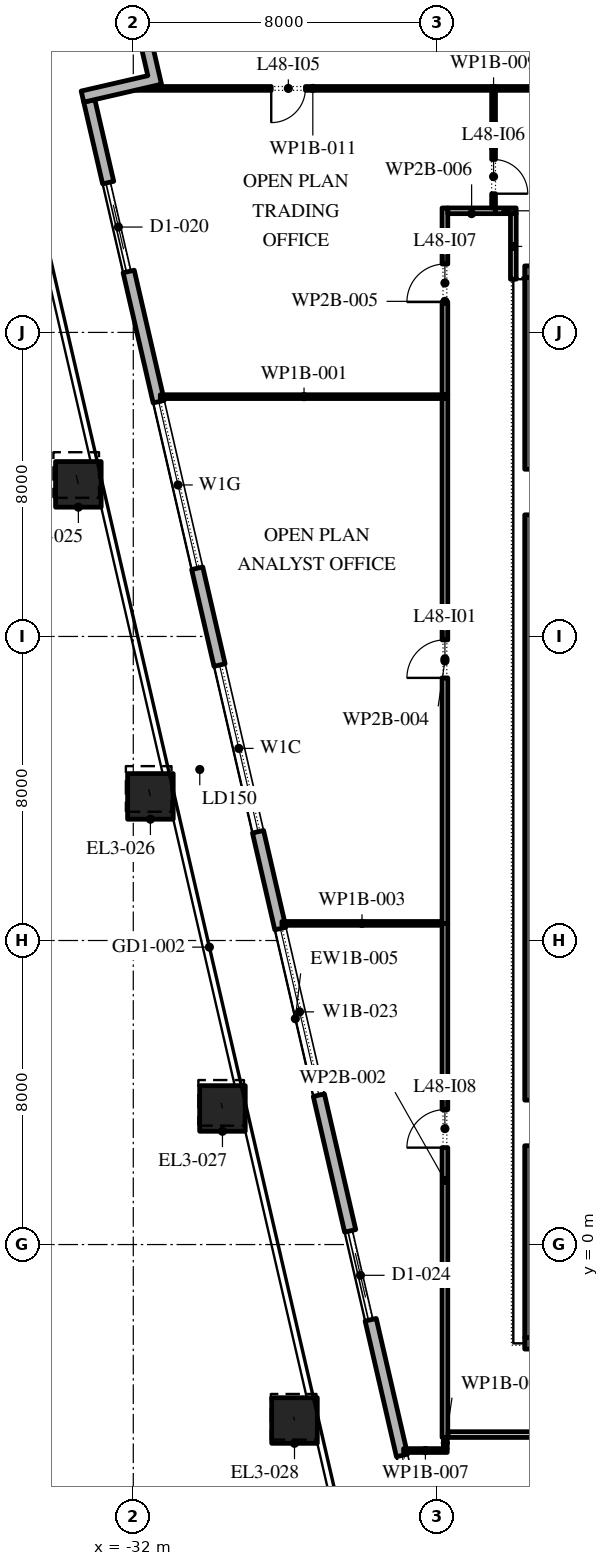
"""IFC4 building model, lengths in metres.
Left out: names, types, materials, properties, quantities, classifications, styles, units other than length and angle.
Written with IfcOpenShell. Run it as: python <this file> out.ifc"""

import sys

from ifc_helpers import new_model, si_unit, direction, frame, frame_2d, origin, origin_2d, place, context, subcontext, project, spatial, polyline, rectangle, outline, extrude, element, fill, save


model = new_model("IFC4")
c1 = context("Model", 3, precision=1e-05, world=origin(), true_north=direction((0.0, 1.0)))
c2 = subcontext(c1, "Body", "Model", "MODEL_VIEW")
j1 = project(units=[si_unit("LENGTHUNIT", "METRE"), si_unit("PLANEANGLEUNIT", "RADIAN")], contexts=[c1])
p1 = place(None, origin())
s1 = spatial("IfcSite", under=j1, at=p1, CompositionType="ELEMENT")
p2 = place(p1, origin())
s2 = spatial("IfcBuilding", under=s1, at=p2, CompositionType="ELEMENT")
p3 = place(p2, frame((0.0, 0.0, 217.8)))
s3 = spatial("IfcBuildingStorey", under=s2, at=p3, CompositionType="ELEMENT", Elevation=217.8)
p4 = place(p3, frame((-33.445, 20.002, 0.0), z_axis=(-0.013461799865, 0.058373149415, 0.998204064995), x_axis=(-0.974423835271, -0.224718021653, 0.0)))
e1 = element("IfcColumn", 1, at=p4, inside=s3, PredefinedType="COLUMN", context=c2, shape_type="SweptSolid", body=[
    extrude(rectangle(XDim=1.2, YDim=1.2, at=origin_2d()), origin(), (0.0, 0.0, 1.0), 4.208),
])
p5 = place(p3, frame((-31.549, 11.792, 0.0), z_axis=(-0.010741593044, 0.046682382742, 0.99885202774), x_axis=(-0.974534000035, -0.224239788565, 0.0)))
e2 = element("IfcColumn", 2, at=p5, inside=s3, PredefinedType="COLUMN", context=c2, shape_type="SweptSolid", body=[
    extrude(rectangle(XDim=1.2, YDim=1.2, at=origin_2d()), origin(), (0.0, 0.0, 1.0), 4.205),
])
p6 = place(p3, frame((-29.654, 3.581, 0.0), z_axis=(-0.008074763646, 0.035029370347, 0.999353661826), x_axis=(-0.974445638882, -0.224623455729, 0.0)))
e3 = element("IfcColumn", 3, at=p6, inside=s3, PredefinedType="COLUMN", context=c2, shape_type="SweptSolid", body=[
    extrude(rectangle(XDim=1.2, YDim=1.2, at=origin_2d()), origin(), (0.0, 0.0, 1.0), 4.203),
])
p7 = place(p3, frame((-27.758, -4.63, 0.0), z_axis=(-0.005404479485, 0.023361298418, 0.999712479335), x_axis=(-0.974268511785, -0.225390476607, 0.0)))
e4 = element("IfcColumn", 4, at=p7, inside=s3, PredefinedType="COLUMN", context=c2, shape_type="SweptSolid", body=[
    extrude(rectangle(XDim=1.2, YDim=1.2, at=origin_2d()), origin(), (0.0, 0.0, 1.0), 4.201),
])
p8 = place(p3, frame((-33.157, 30.092, 0.0), z_axis=(0.0, 0.0, 1.0), x_axis=(0.224950279389, -0.974370243697, 0.0)))
e5 = element("IfcWall", 5, at=p8, inside=s3, PredefinedType="STANDARD", context=c2, shape_type="SweptSolid", body=[
    extrude(rectangle(XDim=49.5, YDim=0.3, at=frame_2d((24.75, 0.0))), origin(), (0.0, 0.0, 1.0), 3.95),
])
p9 = place(p8, frame((2.207, 0.0, 0.0)))
e6 = element("IfcOpeningElement", 6, at=p9, cuts=e5, PredefinedType="OPENING", context=c2, shape_type="SweptSolid", body=[
    extrude(rectangle(XDim=2.4, YDim=3.5, at=frame_2d((1.2, 1.75))), frame((0.0, 0.16, 0.0), z_axis=(0.0, -1.0, 0.0), x_axis=(1.0, 0.0, 0.0)), (0.0, 0.0, 1.0), 0.32),
])
p10 = place(p8, frame((8.121, 0.0, 0.45)))
e7 = element("IfcOpeningElement", 7, at=p10, cuts=e5, PredefinedType="OPENING", context=c2, shape_type="SweptSolid", body=[
    extrude(rectangle(XDim=4.5, YDim=2.775, at=frame_2d((2.25, 1.387))), frame((0.0, 0.16, 0.0), z_axis=(0.0, -1.0, 0.0), x_axis=(1.0, 0.0, 0.0)), (0.0, 0.0, 1.0), 0.32),
])
p11 = place(p8, frame((15.236, 0.0, 0.45)))
e8 = element("IfcOpeningElement", 8, at=p11, cuts=e5, PredefinedType="OPENING", context=c2, shape_type="SweptSolid", body=[
    extrude(rectangle(XDim=4.5, YDim=2.9, at=frame_2d((2.25, 1.45))), frame((0.0, 0.16, 0.0), z_axis=(0.0, -1.0, 0.0), x_axis=(1.0, 0.0, 0.0)), (0.0, 0.0, 1.0), 0.32),
])
p12 = place(p8, frame((22.35, 0.0, 0.45)))
e9 = element("IfcOpeningElement", 9, at=p12, cuts=e5, PredefinedType="OPENING", context=c2, shape_type="SweptSolid", body=[
    extrude(rectangle(XDim=4.5, YDim=2.95, at=frame_2d((2.25, 1.475))), frame((0.0, 0.16, 0.0), z_axis=(0.0, -1.0, 0.0), x_axis=(1.0, 0.0, 0.0)), (0.0, 0.0, 1.0), 0.32),
])
p13 = place(p8, frame((30.514, 0.0, 0.0)))
e10 = element("IfcOpeningElement", 10, at=p13, cuts=e5, PredefinedType="OPENING", context=c2, shape_type="SweptSolid", body=[
    extrude(rectangle(XDim=2.4, YDim=3.5, at=frame_2d((1.2, 1.75))), frame((0.0, 0.16, 0.0), z_axis=(0.0, -1.0, 0.0), x_axis=(1.0, 0.0, 0.0)), (0.0, 0.0, 1.0), 0.32),
])
p14 = place(p8, frame((36.579, 0.0, 0.45)))
e11 = element("IfcOpeningElement", 11, at=p14, cuts=e5, PredefinedType="OPENING", context=c2, shape_type="SweptSolid", body=[
    extrude(rectangle(XDim=4.5, YDim=3.05, at=frame_2d((2.25, 1.525))), frame((0.0, 0.16, 0.0), z_axis=(0.0, -1.0, 0.0), x_axis=(1.0, 0.0, 0.0)), (0.0, 0.0, 1.0), 0.32),
])
p15 = place(p8, frame((43.693, 0.0, 0.45)))
e12 = element("IfcOpeningElement", 12, at=p15, cuts=e5, PredefinedType="OPENING", context=c2, shape_type="SweptSolid", body=[
    extrude(rectangle(XDim=4.5, YDim=3.05, at=frame_2d((2.25, 1.525))), frame((0.0, 0.16, 0.0), z_axis=(0.0, -1.0, 0.0), x_axis=(1.0, 0.0, 0.0)), (0.0, 0.0, 1.0), 0.32),
])
p16 = place(p3, origin())
e13 = element("IfcWall", 13, at=p16, inside=s3, PredefinedType="STANDARD", context=c2, shape_type="SweptSolid", body=[
    extrude(outline(polyline([(-31.617, 30.756), (-32.022, 32.51), (-30.268, 32.914), (-30.605, 34.376), (-30.313, 34.443), (-29.908, 32.69), (-31.662, 32.285), (-31.257, 30.531), (-33.303, 30.058), (-33.371, 30.351), (-31.617, 30.756)])), origin(), (0.0, 0.0, 1.0), 3.95),
])
p17 = place(p3, frame((-21.35, -2.45, 0.0), z_axis=(0.0, 0.0, 1.0), x_axis=(0.0, 1.0, 0.0)))
e14 = element("IfcWall", 14, at=p17, inside=s3, PredefinedType="SHEAR", context=c2, shape_type="SweptSolid", body=[
    extrude(rectangle(XDim=27.9, YDim=0.7, at=frame_2d((13.95, 0.0))), origin(), (0.0, 0.0, 1.0), 3.95),
])
p18 = place(p17, frame((5.05, 0.0, 0.0)))
e15 = element("IfcOpeningElement", 15, at=p18, cuts=e14, PredefinedType="OPENING", context=c2, shape_type="SweptSolid", body=[
    extrude(rectangle(XDim=1.2, YDim=2.1, at=frame_2d((0.6, 1.05))), frame((0.0, 0.36, 0.0), z_axis=(0.0, -1.0, 0.0), x_axis=(1.0, 0.0, 0.0)), (0.0, 0.0, 1.0), 0.72),
])
p19 = place(p17, frame((21.65, 0.0, 0.0)))
e16 = element("IfcOpeningElement", 16, at=p19, cuts=e14, PredefinedType="OPENING", context=c2, shape_type="SweptSolid", body=[
    extrude(rectangle(XDim=1.2, YDim=2.1, at=frame_2d((0.6, 1.05))), frame((0.0, 0.36, 0.0), z_axis=(0.0, -1.0, 0.0), x_axis=(1.0, 0.0, 0.0)), (0.0, 0.0, 1.0), 0.72),
])
for number, where, z_axis, x_axis in (
    (17, (-21.7, -2.6, 0.0), (0.0, 0.0, 1.0), (1.0, 0.0, 0.0)),
    (18, (-21.7, 25.6, 0.0), (0.0, 0.0, 1.0), (1.0, 0.0, 0.0)),
):
    element("IfcWall", number, at=place(p3, frame(where, z_axis=z_axis, x_axis=x_axis)), inside=s3, PredefinedType="SHEAR", context=c2, shape_type="SweptSolid", body=[
        extrude(rectangle(XDim=11.4, YDim=0.3, at=frame_2d((5.7, 0.0))), origin(), (0.0, 0.0, 1.0), 3.95),
    ])
p20 = place(p3, frame((-31.289, 22.31, 0.0), z_axis=(0.0, 0.0, 1.0), x_axis=(1.0, 0.0, 0.0)))
e19 = element("IfcWall", 19, at=p20, inside=s3, PredefinedType="PARTITIONING", context=c2, shape_type="SweptSolid", body=[
    extrude(rectangle(XDim=7.564, YDim=0.1, at=frame_2d((3.782, 0.0))), origin(), (0.0, 0.0, 1.0), 3.95),
])
p21 = place(p3, frame((-23.8, -5.075, 0.0), z_axis=(0.0, 0.0, 1.0), x_axis=(0.0, 1.0, 0.0)))
e20 = element("IfcWall", 20, at=p21, inside=s3, PredefinedType="PARTITIONING", context=c2, shape_type="SweptSolid", body=[
    extrude(rectangle(XDim=13.525, YDim=0.15, at=frame_2d((6.762, 0.0))), origin(), (0.0, 0.0, 1.0), 3.95),
])
p22 = place(p21, frame((7.625, 0.0, 0.0)))
e21 = element("IfcOpeningElement", 21, at=p22, cuts=e20, PredefinedType="OPENING", context=c2, shape_type="SweptSolid", body=[
    extrude(rectangle(XDim=1.0, YDim=2.1, at=frame_2d((0.5, 1.05))), frame((0.0, 0.085, 0.0), z_axis=(0.0, -1.0, 0.0), x_axis=(1.0, 0.0, 0.0)), (0.0, 0.0, 1.0), 0.17),
])
p23 = place(p3, frame((-23.875, 8.45, 0.0), z_axis=(0.0, 0.0, 1.0), x_axis=(-1.0, 0.0, 0.0)))
e22 = element("IfcWall", 22, at=p23, inside=s3, PredefinedType="PARTITIONING", context=c2, shape_type="SweptSolid", body=[
    extrude(rectangle(XDim=4.214, YDim=0.1, at=frame_2d((2.107, 0.0))), origin(), (0.0, 0.0, 1.0), 3.95),
])
p24 = place(p3, frame((-23.8, 8.45, 0.0), z_axis=(0.0, 0.0, 1.0), x_axis=(0.0, 1.0, 0.0)))
e23 = element("IfcWall", 23, at=p24, inside=s3, PredefinedType="PARTITIONING", context=c2, shape_type="SweptSolid", body=[
    extrude(rectangle(XDim=13.81, YDim=0.15, at=frame_2d((6.905, 0.0))), origin(), (0.0, 0.0, 1.0), 3.95),
])
p25 = place(p24, frame((6.46, 0.0, 0.0)))
e24 = element("IfcOpeningElement", 24, at=p25, cuts=e23, PredefinedType="OPENING", context=c2, shape_type="SweptSolid", body=[
    extrude(rectangle(XDim=1.0, YDim=2.1, at=frame_2d((0.5, 1.05))), frame((0.0, 0.085, 0.0), z_axis=(0.0, -1.0, 0.0), x_axis=(1.0, 0.0, 0.0)), (0.0, 0.0, 1.0), 0.17),
])
p26 = place(p3, frame((-23.8, 22.36, 0.0), z_axis=(0.0, 0.0, 1.0), x_axis=(0.0, 1.0, 0.0)))
e25 = element("IfcWall", 25, at=p26, inside=s3, PredefinedType="PARTITIONING", context=c2, shape_type="SweptSolid", body=[
    extrude(rectangle(XDim=4.915, YDim=0.15, at=frame_2d((2.458, 0.0))), origin(), (0.0, 0.0, 1.0), 3.95),
])
p27 = place(p26, frame((2.44, 0.0, 0.0)))
e26 = element("IfcOpeningElement", 26, at=p27, cuts=e25, PredefinedType="OPENING", context=c2, shape_type="SweptSolid", body=[
    extrude(rectangle(XDim=1.0, YDim=2.1, at=frame_2d((0.5, 1.05))), frame((0.0, 0.085, 0.0), z_axis=(0.0, -1.0, 0.0), x_axis=(1.0, 0.0, 0.0)), (0.0, 0.0, 1.0), 0.17),
])
p28 = place(p3, frame((-23.725, 27.2, 0.0), z_axis=(0.0, 0.0, 1.0), x_axis=(1.0, 0.0, 0.0)))
e27 = element("IfcWall", 27, at=p28, inside=s3, PredefinedType="PARTITIONING", context=c2, shape_type="SweptSolid", body=[
    extrude(rectangle(XDim=1.255, YDim=0.15, at=frame_2d((0.627, 0.0))), origin(), (0.0, 0.0, 1.0), 3.95),
])
p29 = place(p3, frame((-23.74, -5.42, 0.0), z_axis=(0.0, 0.0, 1.0), x_axis=(-1.0, 0.0, 0.0)))
e28 = element("IfcWall", 28, at=p29, inside=s3, PredefinedType="PARTITIONING", context=c2, shape_type="SweptSolid", body=[
    extrude(rectangle(XDim=1.147, YDim=0.1, at=frame_2d((0.573, 0.0))), origin(), (0.0, 0.0, 1.0), 3.95),
])
p30 = place(p3, frame((-23.79, -5.075, 0.0), z_axis=(0.0, 0.0, 1.0), x_axis=(0.0, -1.0, 0.0)))
e29 = element("IfcWall", 29, at=p30, inside=s3, PredefinedType="PARTITIONING", context=c2, shape_type="SweptSolid", body=[
    extrude(rectangle(XDim=0.295, YDim=0.1, at=frame_2d((0.147, 0.0))), origin(), (0.0, 0.0, 1.0), 3.95),
])
p31 = place(p3, frame((-22.52, 27.275, 0.0), z_axis=(0.0, 0.0, 1.0), x_axis=(0.0, 1.0, 0.0)))
e30 = element("IfcWall", 30, at=p31, inside=s3, PredefinedType="PARTITIONING", context=c2, shape_type="SweptSolid", body=[
    extrude(rectangle(XDim=3.195, YDim=0.1, at=frame_2d((1.598, 0.0))), origin(), (0.0, 0.0, 1.0), 3.95),
])
p32 = place(p31, frame((0.375, 0.0, 0.0)))
e31 = element("IfcOpeningElement", 31, at=p32, cuts=e30, PredefinedType="OPENING", context=c2, shape_type="SweptSolid", body=[
    extrude(rectangle(XDim=0.9, YDim=2.1, at=frame_2d((0.45, 1.05))), frame((0.0, 0.06, 0.0), z_axis=(0.0, -1.0, 0.0), x_axis=(1.0, 0.0, 0.0)), (0.0, 0.0, 1.0), 0.12),
])
p33 = place(p3, frame((-22.47, 27.2, 0.0), z_axis=(0.0, 0.0, 1.0), x_axis=(1.0, 0.0, 0.0)))
e32 = element("IfcWall", 32, at=p33, inside=s3, PredefinedType="PARTITIONING", context=c2, shape_type="SweptSolid", body=[
    extrude(rectangle(XDim=0.545, YDim=0.15, at=frame_2d((0.272, 0.0))), origin(), (0.0, 0.0, 1.0), 3.95),
])
p34 = place(p3, frame((-22.57, 30.42, 0.0), z_axis=(0.0, 0.0, 1.0), x_axis=(-1.0, 0.0, 0.0)))
e33 = element("IfcWall", 33, at=p34, inside=s3, PredefinedType="PARTITIONING", context=c2, shape_type="SweptSolid", body=[
    extrude(rectangle(XDim=9.412, YDim=0.1, at=frame_2d((4.706, 0.0))), origin(), (0.0, 0.0, 1.0), 3.95),
])
p35 = place(p34, frame((4.9, 0.0, 0.0)))
e34 = element("IfcOpeningElement", 34, at=p35, cuts=e33, PredefinedType="OPENING", context=c2, shape_type="SweptSolid", body=[
    extrude(rectangle(XDim=0.9, YDim=2.1, at=frame_2d((0.45, 1.05))), frame((0.0, 0.06, 0.0), z_axis=(0.0, -1.0, 0.0), x_axis=(1.0, 0.0, 0.0)), (0.0, 0.0, 1.0), 0.12),
])
p36 = place(p3, frame((-22.0, 27.125, 0.0), z_axis=(0.0, 0.0, 1.0), x_axis=(0.0, -1.0, 0.0)))
e35 = element("IfcWall", 35, at=p36, inside=s3, PredefinedType="PARTITIONING", context=c2, shape_type="SweptSolid", body=[
    extrude(rectangle(XDim=1.725, YDim=0.15, at=frame_2d((0.863, 0.0))), origin(), (0.0, 0.0, 1.0), 3.95),
])
p37 = place(p3, frame((-10.0, -5.0, 0.0), z_axis=(0.0, 0.0, 1.0), x_axis=(-1.0, 0.0, 0.0)))
e36 = element("IfcWall", 36, at=p37, inside=s3, PredefinedType="PARTITIONING", context=c2, shape_type="SweptSolid", body=[
    extrude(rectangle(XDim=13.715, YDim=0.15, at=frame_2d((6.857, 0.0))), origin(), (0.0, 0.0, 1.0), 3.95),
])
p38 = place(p37, frame((3.64, 0.0, 0.0)))
e37 = element("IfcOpeningElement", 37, at=p38, cuts=e36, PredefinedType="OPENING", context=c2, shape_type="SweptSolid", body=[
    extrude(rectangle(XDim=1.0, YDim=2.1, at=frame_2d((0.5, 1.05))), frame((0.0, 0.085, 0.0), z_axis=(0.0, -1.0, 0.0), x_axis=(1.0, 0.0, 0.0)), (0.0, 0.0, 1.0), 0.17),
])
p39 = place(p3, frame((-9.88, 30.42, 0.0), z_axis=(0.0, 0.0, 1.0), x_axis=(-1.0, 0.0, 0.0)))
e38 = element("IfcWall", 38, at=p39, inside=s3, PredefinedType="PARTITIONING", context=c2, shape_type="SweptSolid", body=[
    extrude(rectangle(XDim=12.59, YDim=0.1, at=frame_2d((6.295, 0.0))), origin(), (0.0, 0.0, 1.0), 3.95),
])
p40 = place(p9, origin())
e39 = element("IfcDoor", 39, at=p40, inside=s3, OperationType="DOUBLE_DOOR_SLIDING", PredefinedType="DOOR", context=c2, shape_type="SweptSolid", body=[
    extrude(rectangle(XDim=2.4, YDim=3.5, at=frame_2d((1.2, 1.75))), frame((0.0, 0.025, 0.0), z_axis=(0.0, -1.0, 0.0), x_axis=(1.0, 0.0, 0.0)), (0.0, 0.0, 1.0), 0.05),
])
fill(e6, e39)
p41 = place(p10, origin())
e40 = element("IfcWindow", 40, at=p41, inside=s3, PartitioningType="DOUBLE_PANEL_VERTICAL", PredefinedType="WINDOW", context=c2, shape_type="SweptSolid", body=[
    extrude(rectangle(XDim=4.5, YDim=2.775, at=frame_2d((2.25, 1.387))), frame((0.0, 0.03, 0.0), z_axis=(0.0, -1.0, 0.0), x_axis=(1.0, 0.0, 0.0)), (0.0, 0.0, 1.0), 0.06),
])
fill(e7, e40)
p42 = place(p11, origin())
e41 = element("IfcWindow", 41, at=p42, inside=s3, PartitioningType="DOUBLE_PANEL_VERTICAL", PredefinedType="WINDOW", context=c2, shape_type="SweptSolid", body=[
    extrude(rectangle(XDim=4.5, YDim=2.9, at=frame_2d((2.25, 1.45))), frame((0.0, 0.03, 0.0), z_axis=(0.0, -1.0, 0.0), x_axis=(1.0, 0.0, 0.0)), (0.0, 0.0, 1.0), 0.06),
])
fill(e8, e41)
p43 = place(p12, origin())
e42 = element("IfcWindow", 42, at=p43, inside=s3, PartitioningType="DOUBLE_PANEL_VERTICAL", PredefinedType="WINDOW", context=c2, shape_type="SweptSolid", body=[
    extrude(rectangle(XDim=4.5, YDim=2.95, at=frame_2d((2.25, 1.475))), frame((0.0, 0.03, 0.0), z_axis=(0.0, -1.0, 0.0), x_axis=(1.0, 0.0, 0.0)), (0.0, 0.0, 1.0), 0.06),
])
fill(e9, e42)
p44 = place(p13, origin())
e43 = element("IfcDoor", 43, at=p44, inside=s3, OperationType="DOUBLE_DOOR_SLIDING", PredefinedType="DOOR", context=c2, shape_type="SweptSolid", body=[
    extrude(rectangle(XDim=2.4, YDim=3.5, at=frame_2d((1.2, 1.75))), frame((0.0, 0.025, 0.0), z_axis=(0.0, -1.0, 0.0), x_axis=(1.0, 0.0, 0.0)), (0.0, 0.0, 1.0), 0.05),
])
fill(e10, e43)
p45 = place(p14, origin())
e44 = element("IfcWindow", 44, at=p45, inside=s3, PartitioningType="DOUBLE_PANEL_VERTICAL", PredefinedType="WINDOW", context=c2, shape_type="SweptSolid", body=[
    extrude(rectangle(XDim=4.5, YDim=3.05, at=frame_2d((2.25, 1.525))), frame((0.0, 0.03, 0.0), z_axis=(0.0, -1.0, 0.0), x_axis=(1.0, 0.0, 0.0)), (0.0, 0.0, 1.0), 0.06),
])
fill(e11, e44)
p46 = place(p25, origin())
e45 = element("IfcDoor", 45, at=p46, inside=s3, OperationType="SINGLE_SWING_RIGHT", PredefinedType="DOOR", context=c2, shape_type="SweptSolid", body=[
    extrude(rectangle(XDim=1.0, YDim=2.1, at=frame_2d((0.5, 1.05))), frame((0.0, 0.025, 0.0), z_axis=(0.0, -1.0, 0.0), x_axis=(1.0, 0.0, 0.0)), (0.0, 0.0, 1.0), 0.05),
])
fill(e24, e45)
p47 = place(p35, origin())
e46 = element("IfcDoor", 46, at=p47, inside=s3, OperationType="SINGLE_SWING_LEFT", PredefinedType="DOOR", context=c2, shape_type="SweptSolid", body=[
    extrude(rectangle(XDim=0.9, YDim=2.1, at=frame_2d((0.45, 1.05))), frame((0.0, 0.025, 0.0), z_axis=(0.0, -1.0, 0.0), x_axis=(1.0, 0.0, 0.0)), (0.0, 0.0, 1.0), 0.05),
])
fill(e34, e46)
p48 = place(p32, frame((0.9, 0.0, 0.0), z_axis=(0.0, 0.0, 1.0), x_axis=(-1.0, 0.0, 0.0)))
e47 = element("IfcDoor", 47, at=p48, inside=s3, OperationType="SINGLE_SWING_LEFT", PredefinedType="DOOR", context=c2, shape_type="SweptSolid", body=[
    extrude(rectangle(XDim=0.9, YDim=2.1, at=frame_2d((0.45, 1.05))), frame((0.0, 0.025, 0.0), z_axis=(0.0, -1.0, 0.0), x_axis=(1.0, 0.0, 0.0)), (0.0, 0.0, 1.0), 0.05),
])
fill(e31, e47)
p49 = place(p27, origin())
e48 = element("IfcDoor", 48, at=p49, inside=s3, OperationType="SINGLE_SWING_RIGHT", PredefinedType="DOOR", context=c2, shape_type="SweptSolid", body=[
    extrude(rectangle(XDim=1.0, YDim=2.1, at=frame_2d((0.5, 1.05))), frame((0.0, 0.025, 0.0), z_axis=(0.0, -1.0, 0.0), x_axis=(1.0, 0.0, 0.0)), (0.0, 0.0, 1.0), 0.05),
])
fill(e26, e48)
p50 = place(p22, origin())
e49 = element("IfcDoor", 49, at=p50, inside=s3, OperationType="SINGLE_SWING_RIGHT", PredefinedType="DOOR", context=c2, shape_type="SweptSolid", body=[
    extrude(rectangle(XDim=1.0, YDim=2.1, at=frame_2d((0.5, 1.05))), frame((0.0, 0.025, 0.0), z_axis=(0.0, -1.0, 0.0), x_axis=(1.0, 0.0, 0.0)), (0.0, 0.0, 1.0), 0.05),
])
fill(e21, e49)
save(model, sys.argv[1])
